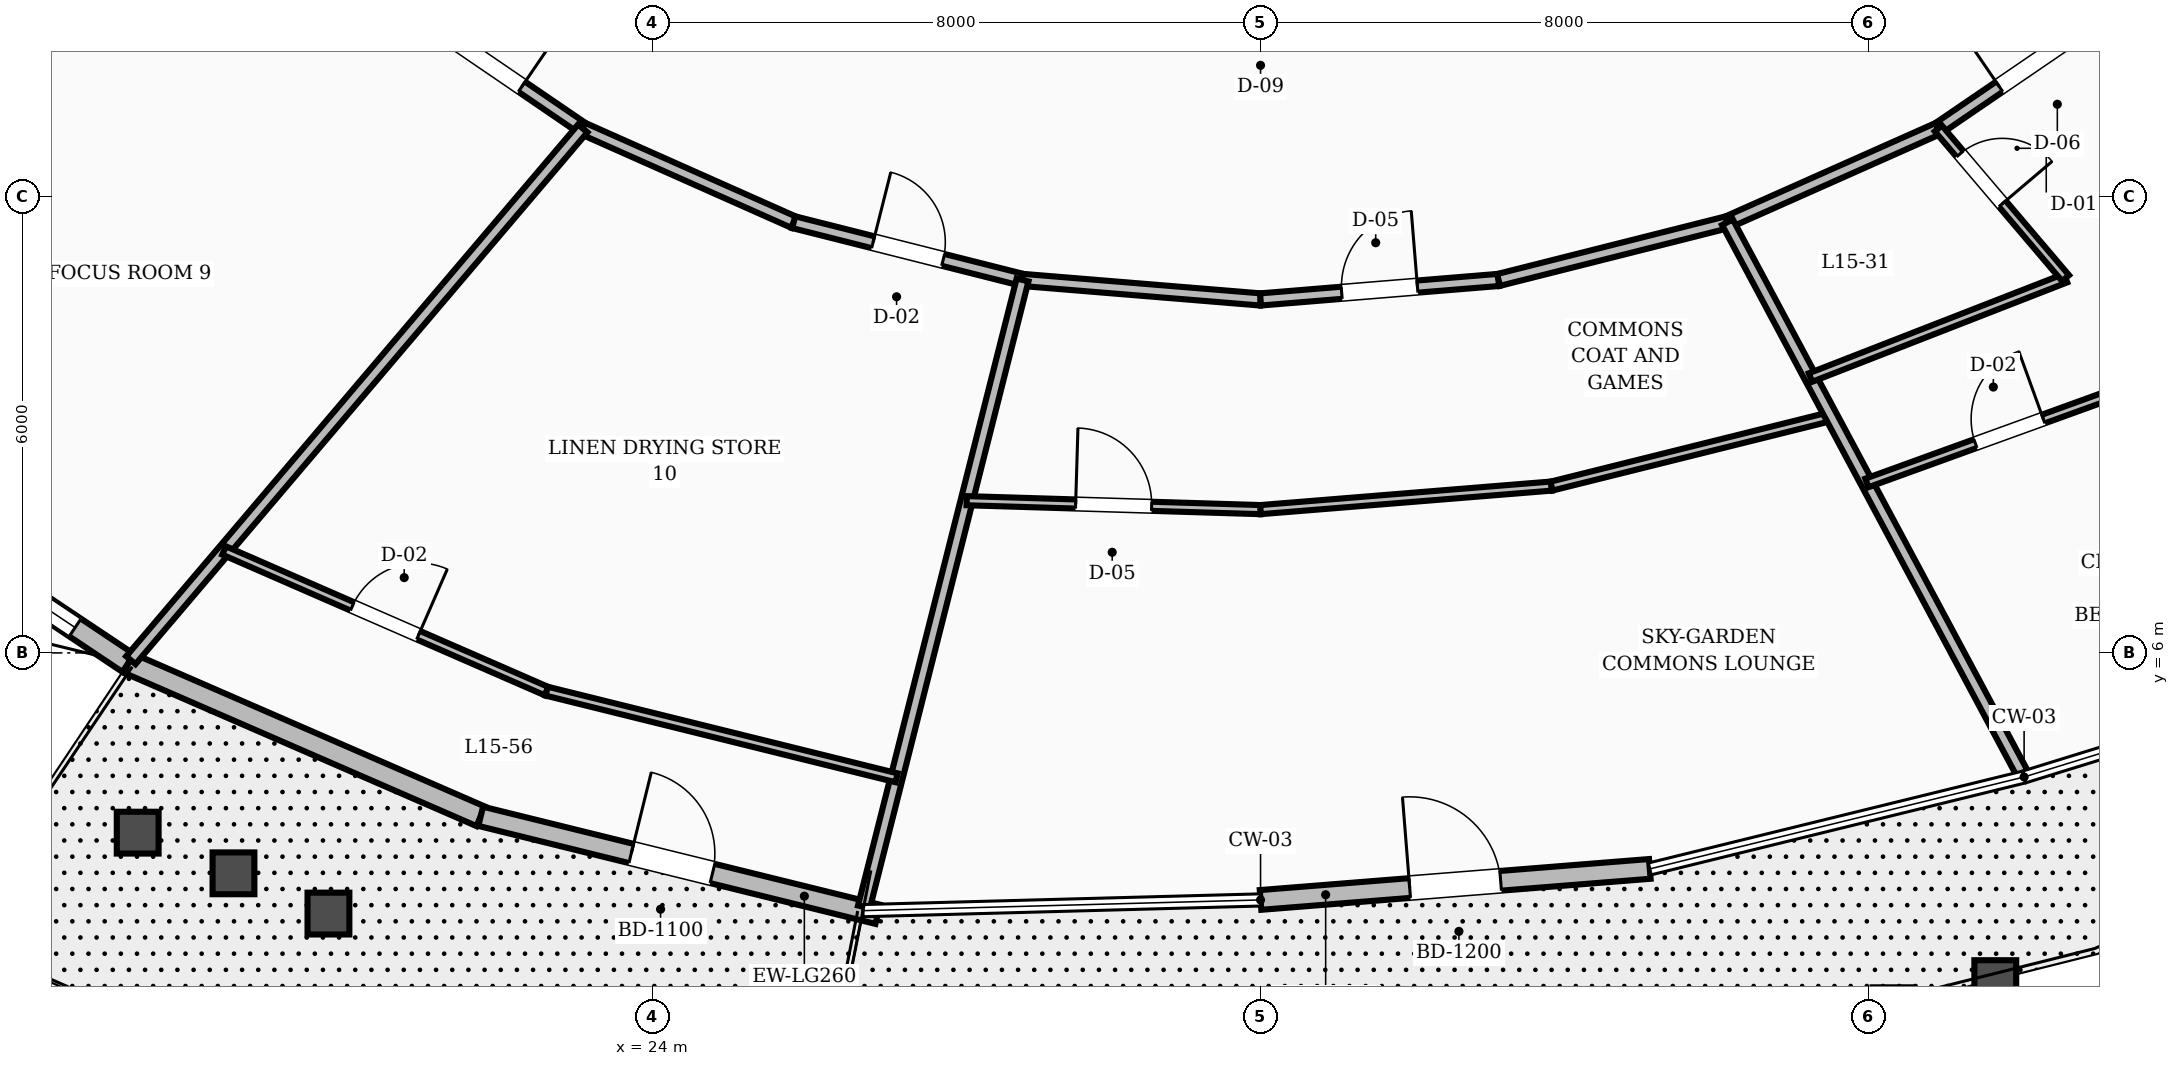
"""IFC4 building model, lengths in metres.
Left out: names, types, materials, properties, quantities, classifications, styles, units other than length and angle.
Written with IfcOpenShell. Run it as: python <this file> out.ifc"""

import sys

from ifc_helpers import new_model, si_unit, direction, frame, frame_2d, origin, place, context, subcontext, project, spatial, rectangle, extrude, element, fill, save


model = new_model("IFC4")
c1 = context("Model", 3, precision=1e-05, world=origin(), true_north=direction((0.0, 1.0)))
c2 = subcontext(c1, "Body", "Model", "MODEL_VIEW")
j1 = project(units=[si_unit("LENGTHUNIT", "METRE"), si_unit("PLANEANGLEUNIT", "RADIAN")], contexts=[c1])
p1 = place(None, origin())
s1 = spatial("IfcSite", under=j1, at=p1, CompositionType="ELEMENT")
p2 = place(p1, origin())
s2 = spatial("IfcBuilding", under=s1, at=p2, CompositionType="ELEMENT")
p3 = place(p2, frame((0.0, 0.0, 62.8)))
s3 = spatial("IfcBuildingStorey", under=s2, at=p3, CompositionType="ELEMENT", Elevation=62.8)
p4 = place(p3, frame((13.042, 8.578, 0.0), z_axis=(0.0, 0.0, 1.0), x_axis=(0.831665633672, -0.555276754213, 0.0)))
e1 = element("IfcWall", 1, at=p4, inside=s3, PredefinedType="STANDARD", context=c2, shape_type="SweptSolid", body=[
    extrude(rectangle(XDim=4.885, YDim=0.28, at=frame_2d((2.442, 0.0))), origin(), (0.0, 0.0, 1.0), 2.71),
])
p5 = place(p4, frame((0.842, 0.0, 0.8)))
e2 = element("IfcOpeningElement", 2, at=p5, cuts=e1, PredefinedType="OPENING", context=c2, shape_type="SweptSolid", body=[
    extrude(rectangle(XDim=3.2, YDim=1.65, at=frame_2d((1.6, 0.825))), frame((0.0, 0.15, 0.0), z_axis=(0.0, -1.0, 0.0), x_axis=(1.0, 0.0, 0.0)), (0.0, 0.0, 1.0), 0.3),
])
p6 = place(p3, frame((17.105, 5.865, 0.0), z_axis=(0.0, 0.0, 1.0), x_axis=(0.917066216605, -0.398734942488, 0.0)))
e3 = element("IfcWall", 3, at=p6, inside=s3, PredefinedType="STANDARD", context=c2, shape_type="SweptSolid", body=[
    extrude(rectangle(XDim=5.054, YDim=0.28, at=frame_2d((2.527, 0.0))), origin(), (0.0, 0.0, 1.0), 2.71),
])
p7 = place(p3, frame((21.74, 3.85, 0.0), z_axis=(0.0, 0.0, 1.0), x_axis=(0.970871984318, -0.239598810654, 0.0)))
e4 = element("IfcWall", 4, at=p7, inside=s3, PredefinedType="STANDARD", context=c2, shape_type="SweptSolid", body=[
    extrude(rectangle(XDim=5.381, YDim=0.26, at=frame_2d((2.69, 0.0))), origin(), (0.0, 0.0, 1.0), 2.71),
])
p8 = place(p7, frame((2.04, 0.0, 0.0)))
e5 = element("IfcOpeningElement", 5, at=p8, cuts=e4, PredefinedType="OPENING", context=c2, shape_type="SweptSolid", body=[
    extrude(rectangle(XDim=1.1, YDim=2.15, at=frame_2d((0.55, 1.075))), frame((0.0, 0.14, 0.0), z_axis=(0.0, -1.0, 0.0), x_axis=(1.0, 0.0, 0.0)), (0.0, 0.0, 1.0), 0.28),
])
p9 = place(p3, frame((32.0, 2.75, 0.0), z_axis=(0.0, 0.0, 1.0), x_axis=(0.996838205284, 0.079458117812, 0.0)))
e6 = element("IfcWall", 6, at=p9, inside=s3, PredefinedType="STANDARD", context=c2, shape_type="SweptSolid", body=[
    extrude(rectangle(XDim=5.137, YDim=0.26, at=frame_2d((2.569, 0.0))), origin(), (0.0, 0.0, 1.0), 2.71),
])
p10 = place(p9, frame((1.969, 0.0, 0.0)))
e7 = element("IfcOpeningElement", 7, at=p10, cuts=e6, PredefinedType="OPENING", context=c2, shape_type="SweptSolid", body=[
    extrude(rectangle(XDim=1.2, YDim=2.15, at=frame_2d((0.6, 1.075))), frame((0.0, 0.14, 0.0), z_axis=(0.0, -1.0, 0.0), x_axis=(1.0, 0.0, 0.0)), (0.0, 0.0, 1.0), 0.28),
])
p11 = place(p3, frame((20.651, 14.56, 0.0), z_axis=(0.0, 0.0, 1.0), x_axis=(0.825929039072, -0.563774088104, 0.0)))
e8 = element("IfcWall", 8, at=p11, inside=s3, PredefinedType="SOLIDWALL", context=c2, shape_type="SweptSolid", body=[
    extrude(rectangle(XDim=2.945, YDim=0.16, at=frame_2d((1.472, 0.0))), origin(), (0.0, 0.0, 1.0), 2.71),
])
p12 = place(p11, frame((0.972, 0.0, 0.0)))
e9 = element("IfcOpeningElement", 9, at=p12, cuts=e8, PredefinedType="OPENING", context=c2, shape_type="SweptSolid", body=[
    extrude(rectangle(XDim=1.0, YDim=2.1, at=frame_2d((0.5, 1.05))), frame((0.0, 0.09, 0.0), z_axis=(0.0, -1.0, 0.0), x_axis=(1.0, 0.0, 0.0)), (0.0, 0.0, 1.0), 0.18),
])
p13 = place(p3, frame((23.083, 12.9, 0.0), z_axis=(0.0, 0.0, 1.0), x_axis=(0.913768445178, -0.406235434936, 0.0)))
e10 = element("IfcWall", 10, at=p13, inside=s3, PredefinedType="SOLIDWALL", context=c2, shape_type="SweptSolid", body=[
    extrude(rectangle(XDim=3.037, YDim=0.16, at=frame_2d((1.519, 0.0))), origin(), (0.0, 0.0, 1.0), 2.71),
])
p14 = place(p3, frame((25.858, 11.666, 0.0), z_axis=(0.0, 0.0, 1.0), x_axis=(0.969608333194, -0.244662380029, 0.0)))
e11 = element("IfcWall", 11, at=p14, inside=s3, PredefinedType="SOLIDWALL", context=c2, shape_type="SweptSolid", body=[
    extrude(rectangle(XDim=3.105, YDim=0.16, at=frame_2d((1.553, 0.0))), origin(), (0.0, 0.0, 1.0), 2.71),
])
p15 = place(p14, frame((1.078, 0.0, 0.0)))
e12 = element("IfcOpeningElement", 12, at=p15, cuts=e11, PredefinedType="OPENING", context=c2, shape_type="SweptSolid", body=[
    extrude(rectangle(XDim=0.95, YDim=2.1, at=frame_2d((0.475, 1.05))), frame((0.0, 0.09, 0.0), z_axis=(0.0, -1.0, 0.0), x_axis=(1.0, 0.0, 0.0)), (0.0, 0.0, 1.0), 0.18),
])
p16 = place(p3, frame((28.869, 10.906, 0.0), z_axis=(0.0, 0.0, 1.0), x_axis=(0.996658973252, -0.081675522876, 0.0)))
e13 = element("IfcWall", 13, at=p16, inside=s3, PredefinedType="SOLIDWALL", context=c2, shape_type="SweptSolid", body=[
    extrude(rectangle(XDim=3.142, YDim=0.16, at=frame_2d((1.571, 0.0))), origin(), (0.0, 0.0, 1.0), 2.71),
])
p17 = place(p3, frame((32.0, 10.65, 0.0), z_axis=(0.0, 0.0, 1.0), x_axis=(0.996658973252, 0.081675522876, 0.0)))
e14 = element("IfcWall", 14, at=p17, inside=s3, PredefinedType="SOLIDWALL", context=c2, shape_type="SweptSolid", body=[
    extrude(rectangle(XDim=3.142, YDim=0.16, at=frame_2d((1.571, 0.0))), origin(), (0.0, 0.0, 1.0), 2.71),
])
p18 = place(p17, frame((1.071, 0.0, 0.0)))
e15 = element("IfcOpeningElement", 15, at=p18, cuts=e14, PredefinedType="OPENING", context=c2, shape_type="SweptSolid", body=[
    extrude(rectangle(XDim=1.0, YDim=2.1, at=frame_2d((0.5, 1.05))), frame((0.0, 0.09, 0.0), z_axis=(0.0, -1.0, 0.0), x_axis=(1.0, 0.0, 0.0)), (0.0, 0.0, 1.0), 0.18),
])
p19 = place(p3, frame((35.131, 10.906, 0.0), z_axis=(0.0, 0.0, 1.0), x_axis=(0.969608333194, 0.244662380029, 0.0)))
e16 = element("IfcWall", 16, at=p19, inside=s3, PredefinedType="SOLIDWALL", context=c2, shape_type="SweptSolid", body=[
    extrude(rectangle(XDim=3.105, YDim=0.16, at=frame_2d((1.553, 0.0))), origin(), (0.0, 0.0, 1.0), 2.71),
])
p20 = place(p3, frame((38.142, 11.666, 0.0), z_axis=(0.0, 0.0, 1.0), x_axis=(0.913768445178, 0.406235434936, 0.0)))
e17 = element("IfcWall", 17, at=p20, inside=s3, PredefinedType="SOLIDWALL", context=c2, shape_type="SweptSolid", body=[
    extrude(rectangle(XDim=3.037, YDim=0.16, at=frame_2d((1.519, 0.0))), origin(), (0.0, 0.0, 1.0), 2.71),
])
p21 = place(p3, frame((40.917, 12.9, 0.0), z_axis=(0.0, 0.0, 1.0), x_axis=(0.825929039072, 0.563774088104, 0.0)))
e18 = element("IfcWall", 18, at=p21, inside=s3, PredefinedType="SOLIDWALL", context=c2, shape_type="SweptSolid", body=[
    extrude(rectangle(XDim=2.945, YDim=0.16, at=frame_2d((1.472, 0.0))), origin(), (0.0, 0.0, 1.0), 2.71),
])
p22 = place(p21, frame((0.972, 0.0, 0.0)))
e19 = element("IfcOpeningElement", 19, at=p22, cuts=e18, PredefinedType="OPENING", context=c2, shape_type="SweptSolid", body=[
    extrude(rectangle(XDim=1.0, YDim=2.1, at=frame_2d((0.5, 1.05))), frame((0.0, 0.09, 0.0), z_axis=(0.0, -1.0, 0.0), x_axis=(1.0, 0.0, 0.0)), (0.0, 0.0, 1.0), 0.18),
])
p23 = place(p3, frame((28.869, 10.906, 0.0), z_axis=(0.0, 0.0, 1.0), x_axis=(-0.245262126669, -0.969456801112, 0.0)))
e20 = element("IfcWall", 20, at=p23, inside=s3, PredefinedType="SOLIDWALL", context=c2, shape_type="SweptSolid", body=[
    extrude(rectangle(XDim=8.509, YDim=0.16, at=frame_2d((4.254, 0.0))), origin(), (0.0, 0.0, 1.0), 2.71),
])
p24 = place(p3, frame((28.134, 8.002, 0.0), z_axis=(0.0, 0.0, 1.0), x_axis=(0.999538975919, -0.030361745969, 0.0)))
e21 = element("IfcWall", 21, at=p24, inside=s3, PredefinedType="PARTITIONING", context=c2, shape_type="SweptSolid", body=[
    extrude(rectangle(XDim=3.868, YDim=0.12, at=frame_2d((1.934, 0.0))), origin(), (0.0, 0.0, 1.0), 2.71),
])
p25 = place(p24, frame((1.434, 0.0, 0.0)))
e22 = element("IfcOpeningElement", 22, at=p25, cuts=e21, PredefinedType="OPENING", context=c2, shape_type="SweptSolid", body=[
    extrude(rectangle(XDim=1.0, YDim=2.1, at=frame_2d((0.5, 1.05))), frame((0.0, 0.07, 0.0), z_axis=(0.0, -1.0, 0.0), x_axis=(1.0, 0.0, 0.0)), (0.0, 0.0, 1.0), 0.14),
])
p26 = place(p3, frame((32.0, 7.885, 0.0), z_axis=(0.0, 0.0, 1.0), x_axis=(0.99674536007, 0.080614435296, 0.0)))
e23 = element("IfcWall", 23, at=p26, inside=s3, PredefinedType="PARTITIONING", context=c2, shape_type="SweptSolid", body=[
    extrude(rectangle(XDim=3.84, YDim=0.12, at=frame_2d((1.92, 0.0))), origin(), (0.0, 0.0, 1.0), 2.71),
])
p27 = place(p3, frame((35.828, 8.195, 0.0), z_axis=(0.0, 0.0, 1.0), x_axis=(0.97032395627, 0.241808643122, 0.0)))
e24 = element("IfcWall", 24, at=p27, inside=s3, PredefinedType="PARTITIONING", context=c2, shape_type="SweptSolid", body=[
    extrude(rectangle(XDim=3.793, YDim=0.12, at=frame_2d((1.896, 0.0))), origin(), (0.0, 0.0, 1.0), 2.71),
])
p28 = place(p3, frame((38.142, 11.666, 0.0), z_axis=(0.0, 0.0, 1.0), x_axis=(0.471604491661, -0.88181018561, 0.0)))
e25 = element("IfcWall", 25, at=p28, inside=s3, PredefinedType="SOLIDWALL", context=c2, shape_type="SweptSolid", body=[
    extrude(rectangle(XDim=8.227, YDim=0.16, at=frame_2d((4.114, 0.0))), origin(), (0.0, 0.0, 1.0), 2.71),
])
p29 = place(p3, frame((39.235, 9.623, 0.0), z_axis=(0.0, 0.0, 1.0), x_axis=(0.931735992912, 0.363136392436, 0.0)))
e26 = element("IfcWall", 26, at=p29, inside=s3, PredefinedType="PARTITIONING", context=c2, shape_type="SweptSolid", body=[
    extrude(rectangle(XDim=3.602, YDim=0.12, at=frame_2d((1.801, 0.0))), origin(), (0.0, 0.0, 1.0), 2.71),
])
p30 = place(p3, frame((40.917, 12.9, 0.0), z_axis=(0.0, 0.0, 1.0), x_axis=(0.647596323354, -0.761983596922, 0.0)))
e27 = element("IfcWall", 27, at=p30, inside=s3, PredefinedType="PARTITIONING", context=c2, shape_type="SweptSolid", body=[
    extrude(rectangle(XDim=2.585, YDim=0.12, at=frame_2d((1.292, 0.0))), origin(), (0.0, 0.0, 1.0), 2.71),
])
p31 = place(p30, frame((0.44, 0.0, 0.0)))
e28 = element("IfcOpeningElement", 28, at=p31, cuts=e27, PredefinedType="OPENING", context=c2, shape_type="SweptSolid", body=[
    extrude(rectangle(XDim=0.86, YDim=2.1, at=frame_2d((0.43, 1.05))), frame((0.0, 0.07, 0.0), z_axis=(0.0, -1.0, 0.0), x_axis=(1.0, 0.0, 0.0)), (0.0, 0.0, 1.0), 0.14),
])
p32 = place(p3, frame((39.977, 8.236, 0.0), z_axis=(0.0, 0.0, 1.0), x_axis=(0.940246590135, 0.340494272696, 0.0)))
e29 = element("IfcWall", 29, at=p32, inside=s3, PredefinedType="PARTITIONING", context=c2, shape_type="SweptSolid", body=[
    extrude(rectangle(XDim=3.988, YDim=0.12, at=frame_2d((1.994, 0.0))), origin(), (0.0, 0.0, 1.0), 2.71),
])
p33 = place(p32, frame((1.519, 0.0, 0.0)))
e30 = element("IfcOpeningElement", 30, at=p33, cuts=e29, PredefinedType="OPENING", context=c2, shape_type="SweptSolid", body=[
    extrude(rectangle(XDim=0.95, YDim=2.1, at=frame_2d((0.475, 1.05))), frame((0.0, 0.07, 0.0), z_axis=(0.0, -1.0, 0.0), x_axis=(1.0, 0.0, 0.0)), (0.0, 0.0, 1.0), 0.14),
])
p34 = place(p3, frame((18.655, 16.583, 0.0), z_axis=(0.0, 0.0, 1.0), x_axis=(-0.885273971372, -0.465069882503, 0.0)))
e31 = element("IfcWall", 31, at=p34, inside=s3, PredefinedType="SOLIDWALL", context=c2, shape_type="SweptSolid", body=[
    extrude(rectangle(XDim=10.056, YDim=0.16, at=frame_2d((5.028, 0.0))), origin(), (0.0, 0.0, 1.0), 2.71),
])
p35 = place(p3, frame((23.083, 12.9, 0.0), z_axis=(0.0, 0.0, 1.0), x_axis=(-0.647577404289, -0.761999675495, 0.0)))
e32 = element("IfcWall", 32, at=p35, inside=s3, PredefinedType="SOLIDWALL", context=c2, shape_type="SweptSolid", body=[
    extrude(rectangle(XDim=9.181, YDim=0.16, at=frame_2d((4.591, 0.0))), origin(), (0.0, 0.0, 1.0), 2.71),
])
p36 = place(p3, frame((18.364, 7.347, 0.0), z_axis=(0.0, 0.0, 1.0), x_axis=(0.916605794734, -0.399792217357, 0.0)))
e33 = element("IfcWall", 33, at=p36, inside=s3, PredefinedType="PARTITIONING", context=c2, shape_type="SweptSolid", body=[
    extrude(rectangle(XDim=4.629, YDim=0.12, at=frame_2d((2.315, 0.0))), origin(), (0.0, 0.0, 1.0), 2.71),
])
p37 = place(p36, frame((1.84, 0.0, 0.0)))
e34 = element("IfcOpeningElement", 34, at=p37, cuts=e33, PredefinedType="OPENING", context=c2, shape_type="SweptSolid", body=[
    extrude(rectangle(XDim=0.95, YDim=2.1, at=frame_2d((0.475, 1.05))), frame((0.0, 0.07, 0.0), z_axis=(0.0, -1.0, 0.0), x_axis=(1.0, 0.0, 0.0)), (0.0, 0.0, 1.0), 0.14),
])
p38 = place(p3, frame((22.608, 5.497, 0.0), z_axis=(0.0, 0.0, 1.0), x_axis=(0.970694040169, -0.240318705846, 0.0)))
e35 = element("IfcWall", 35, at=p38, inside=s3, PredefinedType="PARTITIONING", context=c2, shape_type="SweptSolid", body=[
    extrude(rectangle(XDim=4.743, YDim=0.12, at=frame_2d((2.372, 0.0))), origin(), (0.0, 0.0, 1.0), 2.71),
])
p39 = place(p5, origin())
e36 = element("IfcWindow", 36, at=p39, inside=s3, PartitioningType="SINGLE_PANEL", PredefinedType="WINDOW", context=c2, shape_type="SweptSolid", body=[
    extrude(rectangle(XDim=3.2, YDim=1.65, at=frame_2d((1.6, 0.825))), frame((0.0, 0.03, 0.0), z_axis=(0.0, -1.0, 0.0), x_axis=(1.0, 0.0, 0.0)), (0.0, 0.0, 1.0), 0.06),
])
fill(e2, e36)
p40 = place(p8, origin())
e37 = element("IfcDoor", 37, at=p40, inside=s3, OperationType="SINGLE_SWING_LEFT", PredefinedType="DOOR", context=c2, shape_type="SweptSolid", body=[
    extrude(rectangle(XDim=1.1, YDim=2.15, at=frame_2d((0.55, 1.075))), frame((0.0, 0.025, 0.0), z_axis=(0.0, -1.0, 0.0), x_axis=(1.0, 0.0, 0.0)), (0.0, 0.0, 1.0), 0.05),
])
fill(e5, e37)
p41 = place(p10, origin())
e38 = element("IfcDoor", 38, at=p41, inside=s3, OperationType="SINGLE_SWING_LEFT", PredefinedType="DOOR", context=c2, shape_type="SweptSolid", body=[
    extrude(rectangle(XDim=1.2, YDim=2.15, at=frame_2d((0.6, 1.075))), frame((0.0, 0.025, 0.0), z_axis=(0.0, -1.0, 0.0), x_axis=(1.0, 0.0, 0.0)), (0.0, 0.0, 1.0), 0.05),
])
fill(e7, e38)
p42 = place(p18, origin())
e39 = element("IfcDoor", 39, at=p42, inside=s3, OperationType="SINGLE_SWING_RIGHT", PredefinedType="DOOR", context=c2, shape_type="SweptSolid", body=[
    extrude(rectangle(XDim=1.0, YDim=2.1, at=frame_2d((0.5, 1.05))), frame((0.0, 0.025, 0.0), z_axis=(0.0, -1.0, 0.0), x_axis=(1.0, 0.0, 0.0)), (0.0, 0.0, 1.0), 0.05),
])
fill(e15, e39)
p43 = place(p25, origin())
e40 = element("IfcDoor", 40, at=p43, inside=s3, OperationType="SINGLE_SWING_LEFT", PredefinedType="DOOR", context=c2, shape_type="SweptSolid", body=[
    extrude(rectangle(XDim=1.0, YDim=2.1, at=frame_2d((0.5, 1.05))), frame((0.0, 0.025, 0.0), z_axis=(0.0, -1.0, 0.0), x_axis=(1.0, 0.0, 0.0)), (0.0, 0.0, 1.0), 0.05),
])
fill(e22, e40)
p44 = place(p31, origin())
e41 = element("IfcDoor", 41, at=p44, inside=s3, OperationType="SINGLE_SWING_RIGHT", PredefinedType="DOOR", context=c2, shape_type="SweptSolid", body=[
    extrude(rectangle(XDim=0.86, YDim=2.1, at=frame_2d((0.43, 1.05))), frame((0.0, 0.025, 0.0), z_axis=(0.0, -1.0, 0.0), x_axis=(1.0, 0.0, 0.0)), (0.0, 0.0, 1.0), 0.05),
])
fill(e28, e41)
p45 = place(p22, origin())
e42 = element("IfcDoor", 42, at=p45, inside=s3, OperationType="SINGLE_SWING_LEFT", PredefinedType="DOOR", context=c2, shape_type="SweptSolid", body=[
    extrude(rectangle(XDim=1.0, YDim=2.1, at=frame_2d((0.5, 1.05))), frame((0.0, 0.025, 0.0), z_axis=(0.0, -1.0, 0.0), x_axis=(1.0, 0.0, 0.0)), (0.0, 0.0, 1.0), 0.05),
])
fill(e19, e42)
p46 = place(p33, origin())
e43 = element("IfcDoor", 43, at=p46, inside=s3, OperationType="SINGLE_SWING_RIGHT", PredefinedType="DOOR", context=c2, shape_type="SweptSolid", body=[
    extrude(rectangle(XDim=0.95, YDim=2.1, at=frame_2d((0.475, 1.05))), frame((0.0, 0.025, 0.0), z_axis=(0.0, -1.0, 0.0), x_axis=(1.0, 0.0, 0.0)), (0.0, 0.0, 1.0), 0.05),
])
fill(e30, e43)
p47 = place(p12, origin())
e44 = element("IfcDoor", 44, at=p47, inside=s3, OperationType="SINGLE_SWING_RIGHT", PredefinedType="DOOR", context=c2, shape_type="SweptSolid", body=[
    extrude(rectangle(XDim=1.0, YDim=2.1, at=frame_2d((0.5, 1.05))), frame((0.0, 0.025, 0.0), z_axis=(0.0, -1.0, 0.0), x_axis=(1.0, 0.0, 0.0)), (0.0, 0.0, 1.0), 0.05),
])
fill(e9, e44)
p48 = place(p15, origin())
e45 = element("IfcDoor", 45, at=p48, inside=s3, OperationType="SINGLE_SWING_LEFT", PredefinedType="DOOR", context=c2, shape_type="SweptSolid", body=[
    extrude(rectangle(XDim=0.95, YDim=2.1, at=frame_2d((0.475, 1.05))), frame((0.0, 0.025, 0.0), z_axis=(0.0, -1.0, 0.0), x_axis=(1.0, 0.0, 0.0)), (0.0, 0.0, 1.0), 0.05),
])
fill(e12, e45)
p49 = place(p37, origin())
e46 = element("IfcDoor", 46, at=p49, inside=s3, OperationType="SINGLE_SWING_RIGHT", PredefinedType="DOOR", context=c2, shape_type="SweptSolid", body=[
    extrude(rectangle(XDim=0.95, YDim=2.1, at=frame_2d((0.475, 1.05))), frame((0.0, 0.025, 0.0), z_axis=(0.0, -1.0, 0.0), x_axis=(1.0, 0.0, 0.0)), (0.0, 0.0, 1.0), 0.05),
])
fill(e34, e46)
save(model, sys.argv[1])
